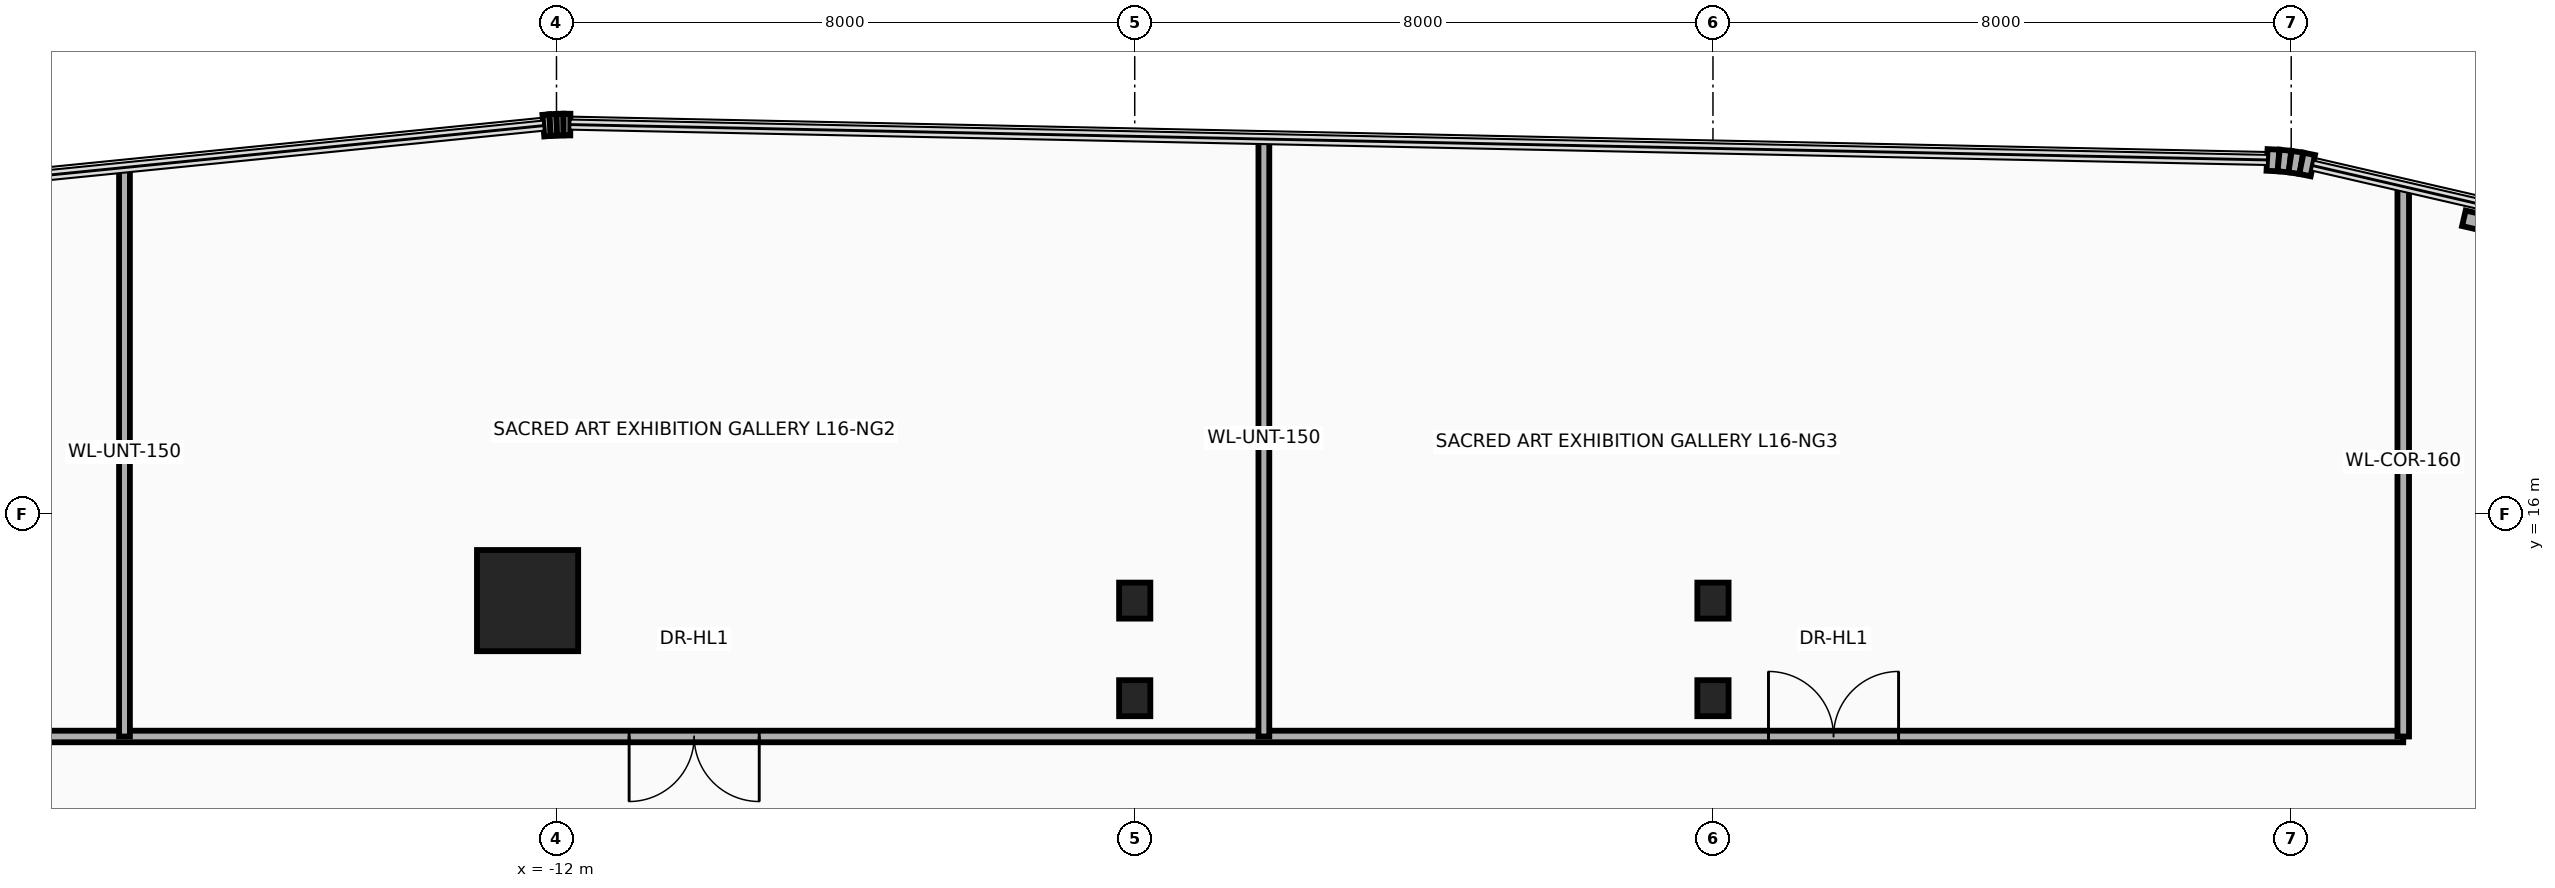
"""IFC4 building model, lengths in metres.
Left out: names, types, materials, properties, quantities, classifications, styles, units other than length and angle.
Written with IfcOpenShell. Run it as: python <this file> out.ifc"""

import sys

from ifc_helpers import new_model, si_unit, direction, frame, frame_2d, origin, origin_2d, place, context, subcontext, project, spatial, rectangle, i_section, extrude, source, transform, mapped, element, fill, save


model = new_model("IFC4")
c1 = context("Model", 3, precision=1e-05, world=origin(), true_north=direction((0.0, 1.0)))
c2 = subcontext(c1, "Body", "Model", "MODEL_VIEW")
j1 = project(units=[si_unit("LENGTHUNIT", "METRE"), si_unit("PLANEANGLEUNIT", "RADIAN")], contexts=[c1])
p1 = place(None, origin())
s1 = spatial("IfcSite", under=j1, at=p1, CompositionType="ELEMENT")
p2 = place(p1, origin())
s2 = spatial("IfcBuilding", under=s1, at=p2, CompositionType="ELEMENT")
p3 = place(p2, frame((0.0, 0.0, 66.7)))
s3 = spatial("IfcBuildingStorey", under=s2, at=p3, CompositionType="ELEMENT", Elevation=66.7)
m1 = source(origin(), c2, "Body", "SweptSolid", [
    extrude(rectangle(XDim=1.4, YDim=1.4, at=origin_2d()), origin(), (0.0, 0.0, 1.0), 3.7),
])
p4 = place(p3, frame((-12.4, 14.8, 0.0), z_axis=(0.0, 0.0, 1.0), x_axis=(1.0, 0.0, 0.0)))
e1 = element("IfcColumn", 1, at=p4, inside=s3, PredefinedType="COLUMN", context=c2, shape_type="MappedRepresentation", body=[
    mapped(m1, transform((0.0, 0.0, 0.0), x_axis=(1.0, 0.0, 0.0), y_axis=(0.0, 1.0, 0.0), z_axis=(0.0, 0.0, 1.0), scale=1.0)),
])
m2 = source(origin(), c2, "Body", "SweptSolid", [
    extrude(i_section(OverallWidth=0.432, OverallDepth=0.498, WebThickness=0.056, FlangeThickness=0.089, at=origin_2d()), origin(), (0.0, 0.0, 1.0), 3.7),
])
for number, where, z_axis, x_axis in (
    (2, (-4.0, 13.45, 0.0), (0.0, 0.0, 1.0), (1.0, 0.0, 0.0)),
    (3, (-4.0, 14.8, 0.0), (0.0, 0.0, 1.0), (1.0, 0.0, 0.0)),
    (4, (4.0, 13.45, 0.0), (0.0, 0.0, 1.0), (1.0, 0.0, 0.0)),
    (5, (4.0, 14.8, 0.0), (0.0, 0.0, 1.0), (1.0, 0.0, 0.0)),
):
    element("IfcColumn", number, at=place(p3, frame(where, z_axis=z_axis, x_axis=x_axis)), inside=s3, PredefinedType="COLUMN", context=c2, shape_type="MappedRepresentation", body=[
        mapped(m2, transform((0.0, 0.0, 0.0), x_axis=(1.0, 0.0, 0.0), y_axis=(0.0, 1.0, 0.0), z_axis=(0.0, 0.0, 1.0), scale=1.0)),
    ])
p5 = place(p3, frame((-12.182, 21.371, 0.0), z_axis=(0.0, 0.0, 1.0), x_axis=(0.996527790842, 0.08326080759, 0.0)))
e6 = element("IfcWall", 6, at=p5, inside=s3, PredefinedType="SOLIDWALL", context=c2, shape_type="SweptSolid", body=[
    extrude(rectangle(XDim=0.094, YDim=0.3, at=frame_2d((0.047, 0.0))), origin(), (0.0, 0.0, 1.0), 3.46),
])
p6 = place(p3, frame((-12.088, 21.379, 0.0), z_axis=(0.0, 0.0, 1.0), x_axis=(0.998476480444, 0.055178963393, 0.0)))
e7 = element("IfcWall", 7, at=p6, inside=s3, PredefinedType="SOLIDWALL", context=c2, shape_type="SweptSolid", body=[
    extrude(rectangle(XDim=0.093, YDim=0.3, at=frame_2d((0.046, 0.0))), origin(), (0.0, 0.0, 1.0), 3.46),
])
p7 = place(p3, frame((-11.996, 21.384, 0.0), z_axis=(0.0, 0.0, 1.0), x_axis=(0.999722573757, 0.023553673204, 0.0)))
e8 = element("IfcWall", 8, at=p7, inside=s3, PredefinedType="SOLIDWALL", context=c2, shape_type="SweptSolid", body=[
    extrude(rectangle(XDim=0.093, YDim=0.3, at=frame_2d((0.047, 0.0))), origin(), (0.0, 0.0, 1.0), 3.46),
])
p8 = place(p3, frame((-11.902, 21.386, 0.0), z_axis=(0.0, 0.0, 1.0), x_axis=(0.999986507273, -0.005194735103, 0.0)))
e9 = element("IfcWall", 9, at=p8, inside=s3, PredefinedType="SOLIDWALL", context=c2, shape_type="SweptSolid", body=[
    extrude(rectangle(XDim=0.094, YDim=0.3, at=frame_2d((0.047, 0.0))), origin(), (0.0, 0.0, 1.0), 3.46),
])
p9 = place(p3, frame((11.666, 20.897, 0.0), z_axis=(0.0, 0.0, 1.0), x_axis=(0.998885297239, -0.047203421059, 0.0)))
e10 = element("IfcWall", 10, at=p9, inside=s3, PredefinedType="SOLIDWALL", context=c2, shape_type="SweptSolid", body=[
    extrude(rectangle(XDim=0.16, YDim=0.3, at=frame_2d((0.08, 0.0))), origin(), (0.0, 0.0, 1.0), 3.46),
])
p10 = place(p3, frame((11.826, 20.889, 0.0), z_axis=(0.0, 0.0, 1.0), x_axis=(0.995172891136, -0.098137234257, 0.0)))
e11 = element("IfcWall", 11, at=p10, inside=s3, PredefinedType="SOLIDWALL", context=c2, shape_type="SweptSolid", body=[
    extrude(rectangle(XDim=0.159, YDim=0.3, at=frame_2d((0.08, 0.0))), origin(), (0.0, 0.0, 1.0), 3.46),
])
p11 = place(p3, frame((11.984, 20.874, 0.0), z_axis=(0.0, 0.0, 1.0), x_axis=(0.988846069207, -0.148941100486, 0.0)))
e12 = element("IfcWall", 12, at=p11, inside=s3, PredefinedType="SOLIDWALL", context=c2, shape_type="SweptSolid", body=[
    extrude(rectangle(XDim=0.159, YDim=0.3, at=frame_2d((0.08, 0.0))), origin(), (0.0, 0.0, 1.0), 3.46),
])
p12 = place(p3, frame((12.142, 20.85, 0.0), z_axis=(0.0, 0.0, 1.0), x_axis=(0.979991950448, -0.19903712482, 0.0)))
e13 = element("IfcWall", 13, at=p12, inside=s3, PredefinedType="SOLIDWALL", context=c2, shape_type="SweptSolid", body=[
    extrude(rectangle(XDim=0.161, YDim=0.3, at=frame_2d((0.08, 0.0))), origin(), (0.0, 0.0, 1.0), 3.46),
])
p13 = place(p3, frame((14.389, 20.09, 0.0), z_axis=(0.0, 0.0, 1.0), x_axis=(0.974400545997, -0.224818984875, 0.0)))
e14 = element("IfcWall", 14, at=p13, inside=s3, PredefinedType="SOLIDWALL", context=c2, shape_type="SweptSolid", body=[
    extrude(rectangle(XDim=2.2, YDim=0.22, at=frame_2d((1.1, 0.0))), origin(), (0.0, 0.0, 1.0), 3.46),
])
p14 = place(p13, frame((0.65, 0.0, 0.95)))
e15 = element("IfcOpeningElement", 15, at=p14, cuts=e14, PredefinedType="OPENING", context=c2, shape_type="SweptSolid", body=[
    extrude(rectangle(XDim=0.9, YDim=1.3, at=frame_2d((0.45, 0.65))), frame((0.0, 0.125, 0.0), z_axis=(0.0, -1.0, 0.0), x_axis=(1.0, 0.0, 0.0)), (0.0, 0.0, 1.0), 0.25),
])
p15 = place(p3, frame((-31.89, 12.92, 0.0), z_axis=(0.0, 0.0, 1.0), x_axis=(1.0, 0.0, 0.0)))
e16 = element("IfcWall", 16, at=p15, inside=s3, PredefinedType="PARTITIONING", context=c2, shape_type="SweptSolid", body=[
    extrude(rectangle(XDim=45.44, YDim=0.16, at=frame_2d((22.72, 0.0))), origin(), (0.0, 0.0, 1.0), 2.583),
])
p16 = place(p15, frame((6.057, 0.0, 0.0)))
e17 = element("IfcOpeningElement", 17, at=p16, cuts=e16, PredefinedType="OPENING", context=c2, shape_type="SweptSolid", body=[
    extrude(rectangle(XDim=1.8, YDim=2.15, at=frame_2d((0.9, 1.075))), frame((0.0, 0.095, 0.0), z_axis=(0.0, -1.0, 0.0), x_axis=(1.0, 0.0, 0.0)), (0.0, 0.0, 1.0), 0.19),
])
p17 = place(p15, frame((20.895, 0.0, 0.0)))
e18 = element("IfcOpeningElement", 18, at=p17, cuts=e16, PredefinedType="OPENING", context=c2, shape_type="SweptSolid", body=[
    extrude(rectangle(XDim=1.8, YDim=2.15, at=frame_2d((0.9, 1.075))), frame((0.0, 0.095, 0.0), z_axis=(0.0, -1.0, 0.0), x_axis=(1.0, 0.0, 0.0)), (0.0, 0.0, 1.0), 0.19),
])
p18 = place(p15, frame((36.658, 0.0, 0.0)))
e19 = element("IfcOpeningElement", 19, at=p18, cuts=e16, PredefinedType="OPENING", context=c2, shape_type="SweptSolid", body=[
    extrude(rectangle(XDim=1.8, YDim=2.15, at=frame_2d((0.9, 1.075))), frame((0.0, 0.095, 0.0), z_axis=(0.0, -1.0, 0.0), x_axis=(1.0, 0.0, 0.0)), (0.0, 0.0, 1.0), 0.19),
])
p19 = place(p3, frame((13.55, 12.92, 0.0), z_axis=(0.0, 0.0, 1.0), x_axis=(0.0, 1.0, 0.0)))
e20 = element("IfcWall", 20, at=p19, inside=s3, PredefinedType="PARTITIONING", context=c2, shape_type="SweptSolid", body=[
    extrude(rectangle(XDim=7.609, YDim=0.16, at=frame_2d((3.805, 0.0))), origin(), (0.0, 0.0, 1.0), 2.583),
])
p20 = place(p3, frame((-17.977, 12.92, 0.0), z_axis=(0.0, 0.0, 1.0), x_axis=(0.0, 1.0, 0.0)))
e21 = element("IfcWall", 21, at=p20, inside=s3, PredefinedType="PARTITIONING", context=c2, shape_type="SweptSolid", body=[
    extrude(rectangle(XDim=7.872, YDim=0.15, at=frame_2d((3.936, 0.0))), origin(), (0.0, 0.0, 1.0), 2.583),
])
p21 = place(p3, frame((-2.213, 12.92, 0.0), z_axis=(0.0, 0.0, 1.0), x_axis=(0.0, 1.0, 0.0)))
e22 = element("IfcWall", 22, at=p21, inside=s3, PredefinedType="PARTITIONING", context=c2, shape_type="SweptSolid", body=[
    extrude(rectangle(XDim=8.266, YDim=0.15, at=frame_2d((4.133, 0.0))), origin(), (0.0, 0.0, 1.0), 2.583),
])
p22 = place(p17, frame((1.8, 0.0, 0.0), z_axis=(0.0, 0.0, 1.0), x_axis=(-1.0, 0.0, 0.0)))
e23 = element("IfcDoor", 23, at=p22, inside=s3, OperationType="DOUBLE_DOOR_SINGLE_SWING", PredefinedType="DOOR", context=c2, shape_type="SweptSolid", body=[
    extrude(rectangle(XDim=1.8, YDim=2.15, at=frame_2d((0.9, 1.075))), frame((0.0, 0.025, 0.0), z_axis=(0.0, -1.0, 0.0), x_axis=(1.0, 0.0, 0.0)), (0.0, 0.0, 1.0), 0.05),
])
fill(e18, e23)
p23 = place(p18, origin())
e24 = element("IfcDoor", 24, at=p23, inside=s3, OperationType="DOUBLE_DOOR_SINGLE_SWING", PredefinedType="DOOR", context=c2, shape_type="SweptSolid", body=[
    extrude(rectangle(XDim=1.8, YDim=2.15, at=frame_2d((0.9, 1.075))), frame((0.0, 0.025, 0.0), z_axis=(0.0, -1.0, 0.0), x_axis=(1.0, 0.0, 0.0)), (0.0, 0.0, 1.0), 0.05),
])
fill(e19, e24)
save(model, sys.argv[1])
